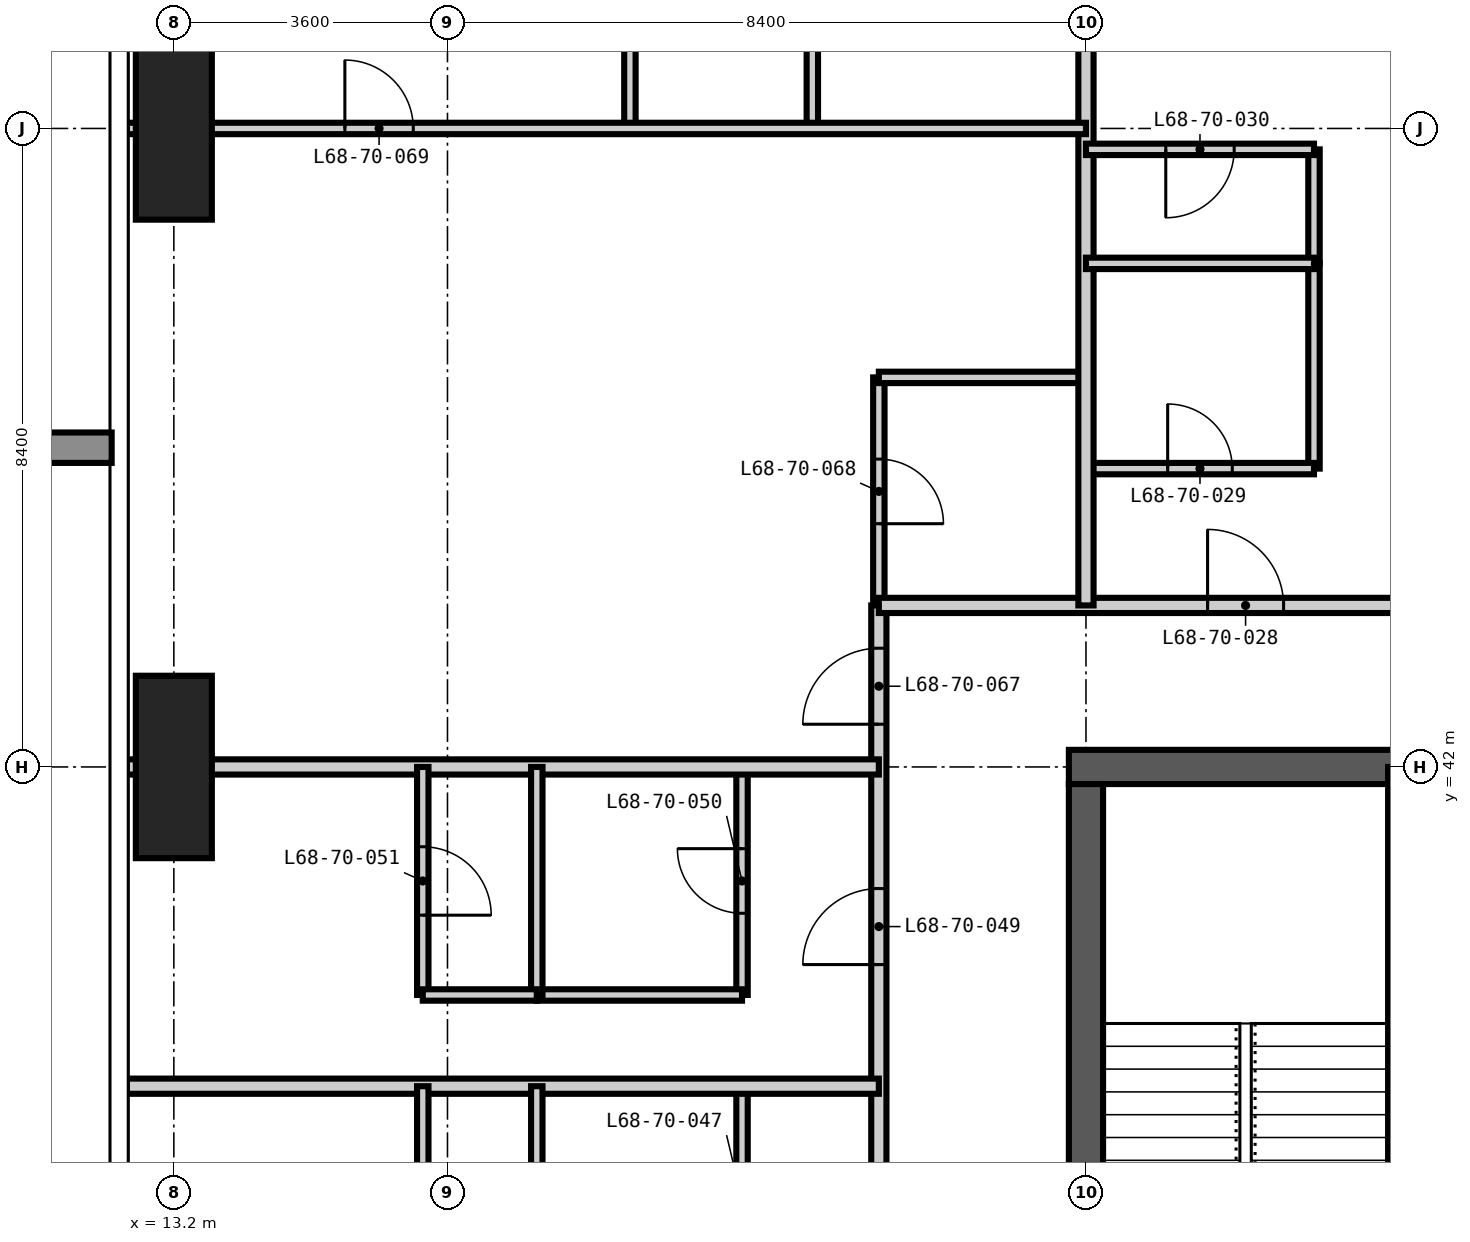
"""IFC4 building model, lengths in metres.
Left out: names, types, materials, properties, quantities, classifications, styles, units other than length and angle.
Written with IfcOpenShell. Run it as: python <this file> out.ifc"""

import sys

from ifc_helpers import new_model, si_unit, direction, frame, frame_2d, origin, origin_2d, place, context, subcontext, project, spatial, rectangle, extrude, element, fill, save


model = new_model("IFC4")
c1 = context("Model", 3, precision=1e-05, world=origin(), true_north=direction((0.0, 1.0)))
c2 = subcontext(c1, "Body", "Model", "MODEL_VIEW")
j1 = project(units=[si_unit("LENGTHUNIT", "METRE"), si_unit("PLANEANGLEUNIT", "RADIAN")], contexts=[c1])
p1 = place(None, origin())
s1 = spatial("IfcSite", under=j1, at=p1, CompositionType="ELEMENT")
p2 = place(p1, origin())
s2 = spatial("IfcBuilding", under=s1, at=p2, CompositionType="ELEMENT")
p3 = place(p2, frame((0.0, 0.0, 264.6)))
s3 = spatial("IfcBuildingStorey", under=s2, at=p3, CompositionType="ELEMENT", Elevation=264.6)
for number, where, z_axis, x_axis in (
    (1, (13.2, 42.0, -0.35), (0.0, 0.0, 1.0), (1.0, 0.0, 0.0)),
    (2, (13.2, 50.4, -0.35), (0.0, 0.0, 1.0), (1.0, 0.0, 0.0)),
):
    element("IfcColumn", number, at=place(p3, frame(where, z_axis=z_axis, x_axis=x_axis)), inside=s3, PredefinedType="COLUMN", context=c2, shape_type="SweptSolid", body=[
        extrude(rectangle(XDim=1.0, YDim=2.4, at=origin_2d()), origin(), (0.0, 0.0, 1.0), 3.9),
    ])
p4 = place(p3, frame((42.225, 42.0, -0.35), z_axis=(0.0, 0.0, 1.0), x_axis=(-1.0, 0.0, 0.0)))
e3 = element("IfcWall", 3, at=p4, inside=s3, PredefinedType="SHEAR", context=c2, shape_type="SweptSolid", body=[
    extrude(rectangle(XDim=17.25, YDim=0.45, at=frame_2d((8.625, 0.0))), origin(), (0.0, 0.0, 1.0), 3.9),
])
p5 = place(p4, frame((10.125, 0.0, 0.35)))
e4 = element("IfcOpeningElement", 4, at=p5, cuts=e3, PredefinedType="OPENING", context=c2, shape_type="SweptSolid", body=[
    extrude(rectangle(XDim=1.2, YDim=2.2, at=frame_2d((0.6, 1.1))), frame((0.0, 0.235, 0.0), z_axis=(0.0, -1.0, 0.0), x_axis=(1.0, 0.0, 0.0)), (0.0, 0.0, 1.0), 0.47),
])
p6 = place(p3, frame((25.2, 41.775, -0.35), z_axis=(0.0, 0.0, 1.0), x_axis=(0.0, -1.0, 0.0)))
e5 = element("IfcWall", 5, at=p6, inside=s3, PredefinedType="SHEAR", context=c2, shape_type="SweptSolid", body=[
    extrude(rectangle(XDim=24.75, YDim=0.45, at=frame_2d((12.375, 0.0))), origin(), (0.0, 0.0, 1.0), 3.9),
])
p7 = place(p6, frame((11.875, 0.0, 0.35)))
e6 = element("IfcOpeningElement", 6, at=p7, cuts=e5, PredefinedType="OPENING", context=c2, shape_type="SweptSolid", body=[
    extrude(rectangle(XDim=1.0, YDim=2.1, at=frame_2d((0.5, 1.05))), frame((0.0, 0.235, 0.0), z_axis=(0.0, -1.0, 0.0), x_axis=(1.0, 0.0, 0.0)), (0.0, 0.0, 1.0), 0.47),
])
p8 = place(p3, frame((29.4, 33.6, -0.35), z_axis=(0.0, 0.0, 1.0), x_axis=(0.0, 1.0, 0.0)))
e7 = element("IfcWall", 7, at=p8, inside=s3, PredefinedType="SHEAR", context=c2, shape_type="SweptSolid", body=[
    extrude(rectangle(XDim=8.4, YDim=0.45, at=frame_2d((4.2, 0.0))), origin(), (0.0, 0.0, 1.0), 3.9),
])
p9 = place(p8, frame((0.525, 0.0, 0.35)))
e8 = element("IfcOpeningElement", 8, at=p9, cuts=e7, PredefinedType="OPENING", context=c2, shape_type="SweptSolid", body=[
    extrude(rectangle(XDim=1.2, YDim=2.2, at=frame_2d((0.6, 1.1))), frame((0.0, 0.235, 0.0), z_axis=(0.0, -1.0, 0.0), x_axis=(1.0, 0.0, 0.0)), (0.0, 0.0, 1.0), 0.47),
])
p10 = place(p3, frame((20.675, 34.8, 0.0), z_axis=(0.0, 0.0, 1.0), x_axis=(0.0, 1.0, 0.0)))
e9 = element("IfcWall", 9, at=p10, inside=s3, PredefinedType="PARTITIONING", context=c2, shape_type="SweptSolid", body=[
    extrude(rectangle(XDim=3.0, YDim=0.15, at=frame_2d((1.5, 0.0))), origin(), (0.0, 0.0, 1.0), 3.55),
])
p11 = place(p10, frame((1.075, 0.0, 0.0)))
e10 = element("IfcOpeningElement", 10, at=p11, cuts=e9, PredefinedType="OPENING", context=c2, shape_type="SweptSolid", body=[
    extrude(rectangle(XDim=0.85, YDim=2.1, at=frame_2d((0.425, 1.05))), frame((0.0, 0.085, 0.0), z_axis=(0.0, -1.0, 0.0), x_axis=(1.0, 0.0, 0.0)), (0.0, 0.0, 1.0), 0.17),
])
p12 = place(p3, frame((20.675, 39.0, 0.0), z_axis=(0.0, 0.0, 1.0), x_axis=(0.0, 1.0, 0.0)))
e11 = element("IfcWall", 11, at=p12, inside=s3, PredefinedType="PARTITIONING", context=c2, shape_type="SweptSolid", body=[
    extrude(rectangle(XDim=3.0, YDim=0.15, at=frame_2d((1.5, 0.0))), origin(), (0.0, 0.0, 1.0), 3.55),
])
p13 = place(p12, frame((1.075, 0.0, 0.0)))
e12 = element("IfcOpeningElement", 12, at=p13, cuts=e11, PredefinedType="OPENING", context=c2, shape_type="SweptSolid", body=[
    extrude(rectangle(XDim=0.85, YDim=2.1, at=frame_2d((0.425, 1.05))), frame((0.0, 0.085, 0.0), z_axis=(0.0, -1.0, 0.0), x_axis=(1.0, 0.0, 0.0)), (0.0, 0.0, 1.0), 0.17),
])
p14 = place(p3, frame((22.475, 44.125, 0.0), z_axis=(0.0, 0.0, 1.0), x_axis=(0.0, 1.0, 0.0)))
e13 = element("IfcWall", 13, at=p14, inside=s3, PredefinedType="PARTITIONING", context=c2, shape_type="SweptSolid", body=[
    extrude(rectangle(XDim=3.0, YDim=0.15, at=frame_2d((1.5, 0.0))), origin(), (0.0, 0.0, 1.0), 3.55),
])
p15 = place(p14, frame((1.075, 0.0, 0.0)))
e14 = element("IfcOpeningElement", 14, at=p15, cuts=e13, PredefinedType="OPENING", context=c2, shape_type="SweptSolid", body=[
    extrude(rectangle(XDim=0.85, YDim=2.1, at=frame_2d((0.425, 1.05))), frame((0.0, 0.085, 0.0), z_axis=(0.0, -1.0, 0.0), x_axis=(1.0, 0.0, 0.0)), (0.0, 0.0, 1.0), 0.17),
])
for number, where, z_axis, x_axis in (
    (15, (28.2, 45.925, 0.0), (0.0, 0.0, 1.0), (0.0, 1.0, 0.0)),
    (16, (17.975, 39.0, 0.0), (0.0, 0.0, 1.0), (1.0, 0.0, 0.0)),
):
    element("IfcWall", number, at=place(p3, frame(where, z_axis=z_axis, x_axis=x_axis)), inside=s3, PredefinedType="PARTITIONING", context=c2, shape_type="SweptSolid", body=[
        extrude(rectangle(XDim=2.7, YDim=0.15, at=frame_2d((1.35, 0.0))), origin(), (0.0, 0.0, 1.0), 3.55),
    ])
p16 = place(p3, frame((25.2, 45.925, 0.0), z_axis=(0.0, 0.0, 1.0), x_axis=(1.0, 0.0, 0.0)))
e17 = element("IfcWall", 17, at=p16, inside=s3, PredefinedType="PARTITIONING", context=c2, shape_type="SweptSolid", body=[
    extrude(rectangle(XDim=3.0, YDim=0.15, at=frame_2d((1.5, 0.0))), origin(), (0.0, 0.0, 1.0), 3.55),
])
p17 = place(p16, frame((1.075, 0.0, 0.0)))
e18 = element("IfcOpeningElement", 18, at=p17, cuts=e17, PredefinedType="OPENING", context=c2, shape_type="SweptSolid", body=[
    extrude(rectangle(XDim=0.85, YDim=2.1, at=frame_2d((0.425, 1.05))), frame((0.0, 0.085, 0.0), z_axis=(0.0, -1.0, 0.0), x_axis=(1.0, 0.0, 0.0)), (0.0, 0.0, 1.0), 0.17),
])
p18 = place(p3, frame((22.475, 47.125, 0.0), z_axis=(0.0, 0.0, 1.0), x_axis=(1.0, 0.0, 0.0)))
e19 = element("IfcWall", 19, at=p18, inside=s3, PredefinedType="PARTITIONING", context=c2, shape_type="SweptSolid", body=[
    extrude(rectangle(XDim=2.725, YDim=0.15, at=frame_2d((1.362, 0.0))), origin(), (0.0, 0.0, 1.0), 3.55),
])
p19 = place(p3, frame((22.475, 14.075, 0.0), z_axis=(0.0, 0.0, 1.0), x_axis=(0.0, 1.0, 0.0)))
e20 = element("IfcWall", 20, at=p19, inside=s3, PredefinedType="PARTITIONING", context=c2, shape_type="SweptSolid", body=[
    extrude(rectangle(XDim=30.05, YDim=0.2, at=frame_2d((15.025, 0.0))), origin(), (0.0, 0.0, 1.0), 3.55),
])
p20 = place(p19, frame((4.325, 0.0, 0.0)))
e21 = element("IfcOpeningElement", 21, at=p20, cuts=e20, PredefinedType="OPENING", context=c2, shape_type="SweptSolid", body=[
    extrude(rectangle(XDim=1.0, YDim=2.2, at=frame_2d((0.5, 1.1))), frame((0.0, 0.11, 0.0), z_axis=(0.0, -1.0, 0.0), x_axis=(1.0, 0.0, 0.0)), (0.0, 0.0, 1.0), 0.22),
])
p21 = place(p19, frame((8.525, 0.0, 0.0)))
e22 = element("IfcOpeningElement", 22, at=p21, cuts=e20, PredefinedType="OPENING", context=c2, shape_type="SweptSolid", body=[
    extrude(rectangle(XDim=1.0, YDim=2.2, at=frame_2d((0.5, 1.1))), frame((0.0, 0.11, 0.0), z_axis=(0.0, -1.0, 0.0), x_axis=(1.0, 0.0, 0.0)), (0.0, 0.0, 1.0), 0.22),
])
p22 = place(p19, frame((13.625, 0.0, 0.0)))
e23 = element("IfcOpeningElement", 23, at=p22, cuts=e20, PredefinedType="OPENING", context=c2, shape_type="SweptSolid", body=[
    extrude(rectangle(XDim=1.0, YDim=2.2, at=frame_2d((0.5, 1.1))), frame((0.0, 0.11, 0.0), z_axis=(0.0, -1.0, 0.0), x_axis=(1.0, 0.0, 0.0)), (0.0, 0.0, 1.0), 0.22),
])
p23 = place(p19, frame((25.325, 0.0, 0.0)))
e24 = element("IfcOpeningElement", 24, at=p23, cuts=e20, PredefinedType="OPENING", context=c2, shape_type="SweptSolid", body=[
    extrude(rectangle(XDim=1.0, YDim=2.2, at=frame_2d((0.5, 1.1))), frame((0.0, 0.11, 0.0), z_axis=(0.0, -1.0, 0.0), x_axis=(1.0, 0.0, 0.0)), (0.0, 0.0, 1.0), 0.22),
])
p24 = place(p19, frame((0.863, 0.0, 0.0)))
e25 = element("IfcOpeningElement", 25, at=p24, cuts=e20, PredefinedType="OPENING", context=c2, shape_type="SweptSolid", body=[
    extrude(rectangle(XDim=1.0, YDim=2.2, at=frame_2d((0.5, 1.1))), frame((0.0, 0.11, 0.0), z_axis=(0.0, -1.0, 0.0), x_axis=(1.0, 0.0, 0.0)), (0.0, 0.0, 1.0), 0.22),
])
p25 = place(p19, frame((28.487, 0.0, 0.0)))
e26 = element("IfcOpeningElement", 26, at=p25, cuts=e20, PredefinedType="OPENING", context=c2, shape_type="SweptSolid", body=[
    extrude(rectangle(XDim=1.0, YDim=2.2, at=frame_2d((0.5, 1.1))), frame((0.0, 0.11, 0.0), z_axis=(0.0, -1.0, 0.0), x_axis=(1.0, 0.0, 0.0)), (0.0, 0.0, 1.0), 0.22),
])
p26 = place(p3, frame((22.475, 44.125, 0.0), z_axis=(0.0, 0.0, 1.0), x_axis=(1.0, 0.0, 0.0)))
e27 = element("IfcWall", 27, at=p26, inside=s3, PredefinedType="PARTITIONING", context=c2, shape_type="SweptSolid", body=[
    extrude(rectangle(XDim=22.85, YDim=0.2, at=frame_2d((11.425, 0.0))), origin(), (0.0, 0.0, 1.0), 3.55),
])
p27 = place(p26, frame((4.325, 0.0, 0.0)))
e28 = element("IfcOpeningElement", 28, at=p27, cuts=e27, PredefinedType="OPENING", context=c2, shape_type="SweptSolid", body=[
    extrude(rectangle(XDim=1.0, YDim=2.2, at=frame_2d((0.5, 1.1))), frame((0.0, 0.11, 0.0), z_axis=(0.0, -1.0, 0.0), x_axis=(1.0, 0.0, 0.0)), (0.0, 0.0, 1.0), 0.22),
])
p28 = place(p26, frame((10.625, 0.0, 0.0)))
e29 = element("IfcOpeningElement", 29, at=p28, cuts=e27, PredefinedType="OPENING", context=c2, shape_type="SweptSolid", body=[
    extrude(rectangle(XDim=1.0, YDim=2.2, at=frame_2d((0.5, 1.1))), frame((0.0, 0.11, 0.0), z_axis=(0.0, -1.0, 0.0), x_axis=(1.0, 0.0, 0.0)), (0.0, 0.0, 1.0), 0.22),
])
p29 = place(p26, frame((16.925, 0.0, 0.0)))
e30 = element("IfcOpeningElement", 30, at=p29, cuts=e27, PredefinedType="OPENING", context=c2, shape_type="SweptSolid", body=[
    extrude(rectangle(XDim=1.0, YDim=2.2, at=frame_2d((0.5, 1.1))), frame((0.0, 0.11, 0.0), z_axis=(0.0, -1.0, 0.0), x_axis=(1.0, 0.0, 0.0)), (0.0, 0.0, 1.0), 0.22),
])
p30 = place(p3, frame((25.2, 44.125, 0.0), z_axis=(0.0, 0.0, 1.0), x_axis=(0.0, 1.0, 0.0)))
e31 = element("IfcWall", 31, at=p30, inside=s3, PredefinedType="PARTITIONING", context=c2, shape_type="SweptSolid", body=[
    extrude(rectangle(XDim=10.493, YDim=0.2, at=frame_2d((5.247, 0.0))), origin(), (0.0, 0.0, 1.0), 3.55),
])
for number, where, z_axis, x_axis in (
    (32, (12.582, 37.8, 0.0), (0.0, 0.0, 1.0), (1.0, 0.0, 0.0)),
    (33, (12.582, 42.0, 0.0), (0.0, 0.0, 1.0), (1.0, 0.0, 0.0)),
):
    element("IfcWall", number, at=place(p3, frame(where, z_axis=z_axis, x_axis=x_axis)), inside=s3, PredefinedType="PARTITIONING", context=c2, shape_type="SweptSolid", body=[
        extrude(rectangle(XDim=9.893, YDim=0.2, at=frame_2d((4.947, 0.0))), origin(), (0.0, 0.0, 1.0), 3.55),
    ])
p31 = place(p3, frame((16.475, 34.8, 0.0), z_axis=(0.0, 0.0, 1.0), x_axis=(0.0, 1.0, 0.0)))
e34 = element("IfcWall", 34, at=p31, inside=s3, PredefinedType="PARTITIONING", context=c2, shape_type="SweptSolid", body=[
    extrude(rectangle(XDim=3.0, YDim=0.15, at=frame_2d((1.5, 0.0))), origin(), (0.0, 0.0, 1.0), 3.55),
])
p32 = place(p31, frame((1.05, 0.0, 0.0)))
e35 = element("IfcOpeningElement", 35, at=p32, cuts=e34, PredefinedType="OPENING", context=c2, shape_type="SweptSolid", body=[
    extrude(rectangle(XDim=0.9, YDim=2.1, at=frame_2d((0.45, 1.05))), frame((0.0, 0.085, 0.0), z_axis=(0.0, -1.0, 0.0), x_axis=(1.0, 0.0, 0.0)), (0.0, 0.0, 1.0), 0.17),
])
p33 = place(p3, frame((16.475, 39.0, 0.0), z_axis=(0.0, 0.0, 1.0), x_axis=(0.0, 1.0, 0.0)))
e36 = element("IfcWall", 36, at=p33, inside=s3, PredefinedType="PARTITIONING", context=c2, shape_type="SweptSolid", body=[
    extrude(rectangle(XDim=3.0, YDim=0.15, at=frame_2d((1.5, 0.0))), origin(), (0.0, 0.0, 1.0), 3.55),
])
p34 = place(p33, frame((1.05, 0.0, 0.0)))
e37 = element("IfcOpeningElement", 37, at=p34, cuts=e36, PredefinedType="OPENING", context=c2, shape_type="SweptSolid", body=[
    extrude(rectangle(XDim=0.9, YDim=2.1, at=frame_2d((0.45, 1.05))), frame((0.0, 0.085, 0.0), z_axis=(0.0, -1.0, 0.0), x_axis=(1.0, 0.0, 0.0)), (0.0, 0.0, 1.0), 0.17),
])
for number, where, z_axis, x_axis in (
    (38, (17.975, 34.8, 0.0), (0.0, 0.0, 1.0), (0.0, 1.0, 0.0)),
    (39, (17.975, 39.0, 0.0), (0.0, 0.0, 1.0), (0.0, 1.0, 0.0)),
):
    element("IfcWall", number, at=place(p3, frame(where, z_axis=z_axis, x_axis=x_axis)), inside=s3, PredefinedType="PARTITIONING", context=c2, shape_type="SweptSolid", body=[
        extrude(rectangle(XDim=3.0, YDim=0.15, at=frame_2d((1.5, 0.0))), origin(), (0.0, 0.0, 1.0), 3.55),
    ])
p35 = place(p3, frame((19.2, 50.4, 0.0), z_axis=(0.0, 0.0, 1.0), x_axis=(0.0, 1.0, 0.0)))
e40 = element("IfcWall", 40, at=p35, inside=s3, PredefinedType="PARTITIONING", context=c2, shape_type="SweptSolid", body=[
    extrude(rectangle(XDim=3.0, YDim=0.15, at=frame_2d((1.5, 0.0))), origin(), (0.0, 0.0, 1.0), 3.55),
])
p36 = place(p35, frame((1.05, 0.0, 0.0)))
e41 = element("IfcOpeningElement", 41, at=p36, cuts=e40, PredefinedType="OPENING", context=c2, shape_type="SweptSolid", body=[
    extrude(rectangle(XDim=0.9, YDim=2.1, at=frame_2d((0.45, 1.05))), frame((0.0, 0.085, 0.0), z_axis=(0.0, -1.0, 0.0), x_axis=(1.0, 0.0, 0.0)), (0.0, 0.0, 1.0), 0.17),
])
p37 = place(p3, frame((21.6, 50.4, 0.0), z_axis=(0.0, 0.0, 1.0), x_axis=(0.0, 1.0, 0.0)))
e42 = element("IfcWall", 42, at=p37, inside=s3, PredefinedType="PARTITIONING", context=c2, shape_type="SweptSolid", body=[
    extrude(rectangle(XDim=3.0, YDim=0.15, at=frame_2d((1.5, 0.0))), origin(), (0.0, 0.0, 1.0), 3.55),
])
for number, where, z_axis, x_axis in (
    (43, (28.2, 48.625, 0.0), (0.0, 0.0, 1.0), (0.0, 1.0, 0.0)),
    (44, (16.475, 39.0, 0.0), (0.0, 0.0, 1.0), (1.0, 0.0, 0.0)),
):
    element("IfcWall", number, at=place(p3, frame(where, z_axis=z_axis, x_axis=x_axis)), inside=s3, PredefinedType="PARTITIONING", context=c2, shape_type="SweptSolid", body=[
        extrude(rectangle(XDim=1.5, YDim=0.15, at=frame_2d((0.75, 0.0))), origin(), (0.0, 0.0, 1.0), 3.55),
    ])
p38 = place(p3, frame((25.2, 48.625, 0.0), z_axis=(0.0, 0.0, 1.0), x_axis=(1.0, 0.0, 0.0)))
e45 = element("IfcWall", 45, at=p38, inside=s3, PredefinedType="PARTITIONING", context=c2, shape_type="SweptSolid", body=[
    extrude(rectangle(XDim=3.0, YDim=0.15, at=frame_2d((1.5, 0.0))), origin(), (0.0, 0.0, 1.0), 3.55),
])
p39 = place(p3, frame((25.2, 50.125, 0.0), z_axis=(0.0, 0.0, 1.0), x_axis=(1.0, 0.0, 0.0)))
e46 = element("IfcWall", 46, at=p39, inside=s3, PredefinedType="PARTITIONING", context=c2, shape_type="SweptSolid", body=[
    extrude(rectangle(XDim=3.0, YDim=0.15, at=frame_2d((1.5, 0.0))), origin(), (0.0, 0.0, 1.0), 3.55),
])
p40 = place(p39, frame((1.05, 0.0, 0.0)))
e47 = element("IfcOpeningElement", 47, at=p40, cuts=e46, PredefinedType="OPENING", context=c2, shape_type="SweptSolid", body=[
    extrude(rectangle(XDim=0.9, YDim=2.1, at=frame_2d((0.45, 1.05))), frame((0.0, 0.085, 0.0), z_axis=(0.0, -1.0, 0.0), x_axis=(1.0, 0.0, 0.0)), (0.0, 0.0, 1.0), 0.17),
])
p41 = place(p3, frame((12.582, 50.4, 0.0), z_axis=(0.0, 0.0, 1.0), x_axis=(1.0, 0.0, 0.0)))
e48 = element("IfcWall", 48, at=p41, inside=s3, PredefinedType="PARTITIONING", context=c2, shape_type="SweptSolid", body=[
    extrude(rectangle(XDim=12.618, YDim=0.15, at=frame_2d((6.309, 0.0))), origin(), (0.0, 0.0, 1.0), 3.55),
])
p42 = place(p41, frame((2.868, 0.0, 0.0)))
e49 = element("IfcOpeningElement", 49, at=p42, cuts=e48, PredefinedType="OPENING", context=c2, shape_type="SweptSolid", body=[
    extrude(rectangle(XDim=0.9, YDim=2.1, at=frame_2d((0.45, 1.05))), frame((0.0, 0.085, 0.0), z_axis=(0.0, -1.0, 0.0), x_axis=(1.0, 0.0, 0.0)), (0.0, 0.0, 1.0), 0.17),
])
p43 = place(p27, origin())
e50 = element("IfcDoor", 50, at=p43, inside=s3, OperationType="SINGLE_SWING_LEFT", PredefinedType="DOOR", context=c2, shape_type="SweptSolid", body=[
    extrude(rectangle(XDim=1.0, YDim=2.2, at=frame_2d((0.5, 1.1))), frame((0.0, 0.025, 0.0), z_axis=(0.0, -1.0, 0.0), x_axis=(1.0, 0.0, 0.0)), (0.0, 0.0, 1.0), 0.05),
])
fill(e28, e50)
p44 = place(p17, origin())
e51 = element("IfcDoor", 51, at=p44, inside=s3, OperationType="SINGLE_SWING_LEFT", PredefinedType="DOOR", context=c2, shape_type="SweptSolid", body=[
    extrude(rectangle(XDim=0.85, YDim=2.1, at=frame_2d((0.425, 1.05))), frame((0.0, 0.025, 0.0), z_axis=(0.0, -1.0, 0.0), x_axis=(1.0, 0.0, 0.0)), (0.0, 0.0, 1.0), 0.05),
])
fill(e18, e51)
p45 = place(p40, frame((0.9, 0.0, 0.0), z_axis=(0.0, 0.0, 1.0), x_axis=(-1.0, 0.0, 0.0)))
e52 = element("IfcDoor", 52, at=p45, inside=s3, OperationType="SINGLE_SWING_RIGHT", PredefinedType="DOOR", context=c2, shape_type="SweptSolid", body=[
    extrude(rectangle(XDim=0.9, YDim=2.1, at=frame_2d((0.45, 1.05))), frame((0.0, 0.025, 0.0), z_axis=(0.0, -1.0, 0.0), x_axis=(1.0, 0.0, 0.0)), (0.0, 0.0, 1.0), 0.05),
])
fill(e47, e52)
p46 = place(p23, origin())
e53 = element("IfcDoor", 53, at=p46, inside=s3, OperationType="SINGLE_SWING_LEFT", PredefinedType="DOOR", context=c2, shape_type="SweptSolid", body=[
    extrude(rectangle(XDim=1.0, YDim=2.2, at=frame_2d((0.5, 1.1))), frame((0.0, 0.025, 0.0), z_axis=(0.0, -1.0, 0.0), x_axis=(1.0, 0.0, 0.0)), (0.0, 0.0, 1.0), 0.05),
])
fill(e24, e53)
p47 = place(p13, origin())
e54 = element("IfcDoor", 54, at=p47, inside=s3, OperationType="SINGLE_SWING_RIGHT", PredefinedType="DOOR", context=c2, shape_type="SweptSolid", body=[
    extrude(rectangle(XDim=0.85, YDim=2.1, at=frame_2d((0.425, 1.05))), frame((0.0, 0.025, 0.0), z_axis=(0.0, -1.0, 0.0), x_axis=(1.0, 0.0, 0.0)), (0.0, 0.0, 1.0), 0.05),
])
fill(e12, e54)
p48 = place(p34, frame((0.9, 0.0, 0.0), z_axis=(0.0, 0.0, 1.0), x_axis=(-1.0, 0.0, 0.0)))
e55 = element("IfcDoor", 55, at=p48, inside=s3, OperationType="SINGLE_SWING_RIGHT", PredefinedType="DOOR", context=c2, shape_type="SweptSolid", body=[
    extrude(rectangle(XDim=0.9, YDim=2.1, at=frame_2d((0.45, 1.05))), frame((0.0, 0.025, 0.0), z_axis=(0.0, -1.0, 0.0), x_axis=(1.0, 0.0, 0.0)), (0.0, 0.0, 1.0), 0.05),
])
fill(e37, e55)
p49 = place(p25, origin())
e56 = element("IfcDoor", 56, at=p49, inside=s3, OperationType="SINGLE_SWING_LEFT", PredefinedType="DOOR", context=c2, shape_type="SweptSolid", body=[
    extrude(rectangle(XDim=1.0, YDim=2.2, at=frame_2d((0.5, 1.1))), frame((0.0, 0.025, 0.0), z_axis=(0.0, -1.0, 0.0), x_axis=(1.0, 0.0, 0.0)), (0.0, 0.0, 1.0), 0.05),
])
fill(e26, e56)
p50 = place(p15, frame((0.85, 0.0, 0.0), z_axis=(0.0, 0.0, 1.0), x_axis=(-1.0, 0.0, 0.0)))
e57 = element("IfcDoor", 57, at=p50, inside=s3, OperationType="SINGLE_SWING_RIGHT", PredefinedType="DOOR", context=c2, shape_type="SweptSolid", body=[
    extrude(rectangle(XDim=0.85, YDim=2.1, at=frame_2d((0.425, 1.05))), frame((0.0, 0.025, 0.0), z_axis=(0.0, -1.0, 0.0), x_axis=(1.0, 0.0, 0.0)), (0.0, 0.0, 1.0), 0.05),
])
fill(e14, e57)
p51 = place(p42, origin())
e58 = element("IfcDoor", 58, at=p51, inside=s3, OperationType="SINGLE_SWING_LEFT", PredefinedType="DOOR", context=c2, shape_type="SweptSolid", body=[
    extrude(rectangle(XDim=0.9, YDim=2.1, at=frame_2d((0.45, 1.05))), frame((0.0, 0.025, 0.0), z_axis=(0.0, -1.0, 0.0), x_axis=(1.0, 0.0, 0.0)), (0.0, 0.0, 1.0), 0.05),
])
fill(e49, e58)
save(model, sys.argv[1])
